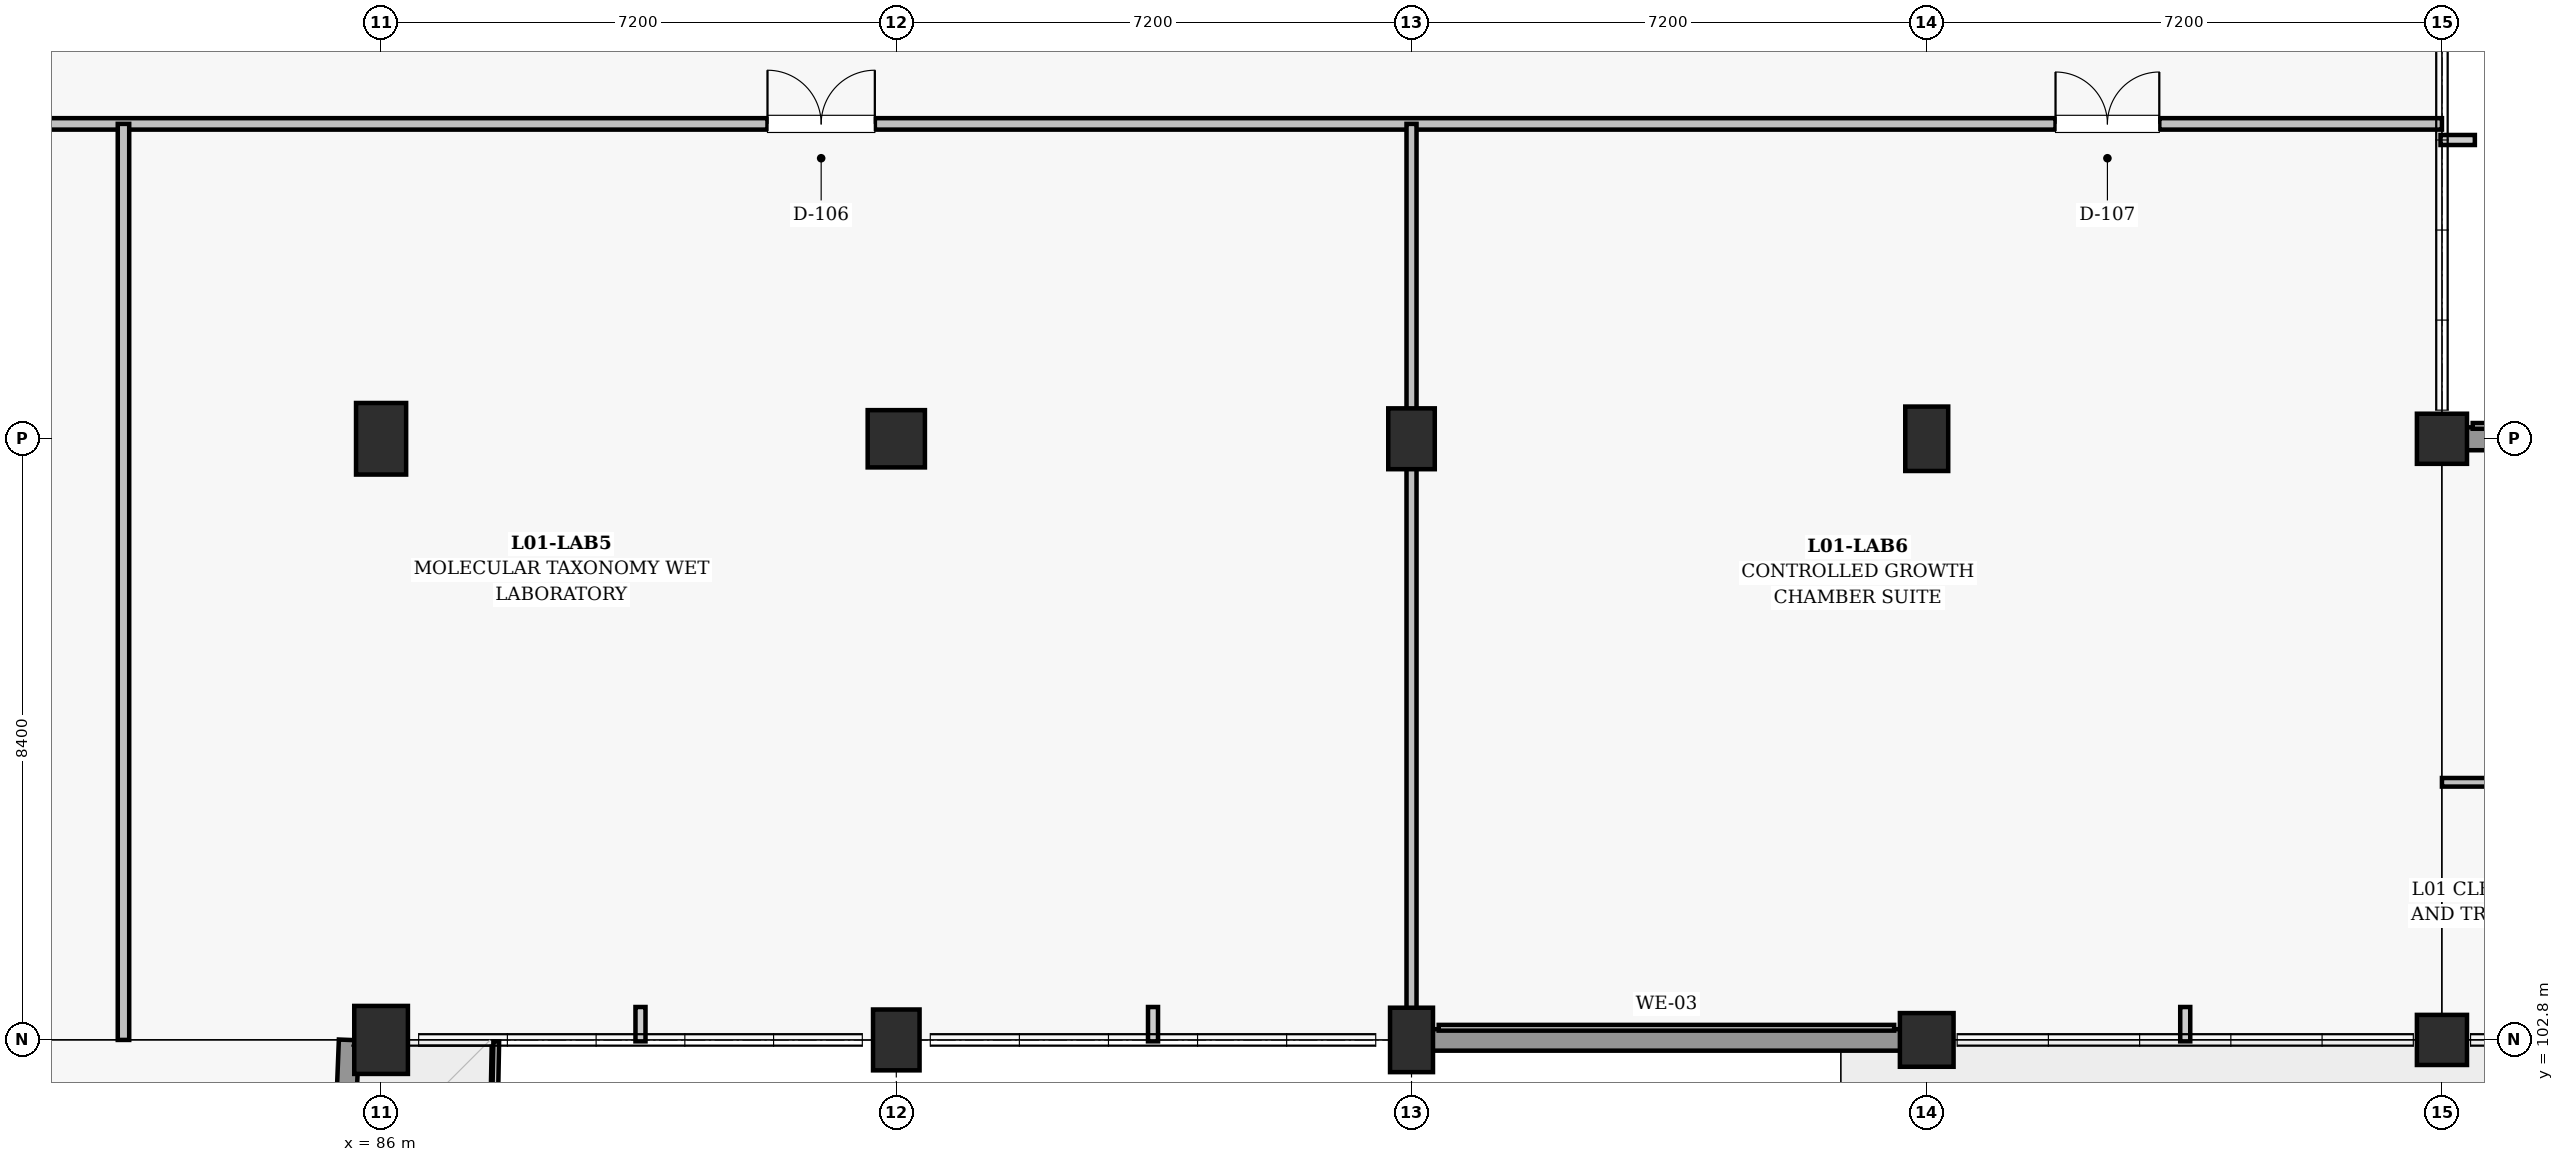
"""IFC4 building model, lengths in metres.
Left out: names, types, materials, properties, quantities, classifications, styles, units other than length and angle.
Written with IfcOpenShell. Run it as: python <this file> out.ifc"""

import sys

from ifc_helpers import new_model, si_unit, direction, frame, frame_2d, origin, origin_2d, place, context, subcontext, project, spatial, rectangle, extrude, element, fill, save


model = new_model("IFC4")
c1 = context("Model", 3, precision=1e-05, world=origin(), true_north=direction((0.0, 1.0)))
c2 = subcontext(c1, "Body", "Model", "MODEL_VIEW")
j1 = project(units=[si_unit("LENGTHUNIT", "METRE"), si_unit("PLANEANGLEUNIT", "RADIAN")], contexts=[c1])
p1 = place(None, origin())
s1 = spatial("IfcSite", under=j1, at=p1, CompositionType="ELEMENT")
p2 = place(p1, origin())
s2 = spatial("IfcBuilding", under=s1, at=p2, CompositionType="ELEMENT")
p3 = place(p2, frame((0.0, 0.0, 5.4)))
s3 = spatial("IfcBuildingStorey", under=s2, at=p3, CompositionType="ELEMENT", Elevation=5.4)
p4 = place(p3, frame((86.0, 102.8, 0.0), z_axis=(0.0, 0.0, 1.0), x_axis=(1.0, 0.0, 0.0)))
e1 = element("IfcColumn", 1, at=p4, inside=s3, PredefinedType="COLUMN", context=c2, shape_type="SweptSolid", body=[
    extrude(rectangle(XDim=0.75, YDim=0.95, at=origin_2d()), origin(), (0.0, 0.0, 1.0), 4.5),
])
p5 = place(p3, frame((86.0, 111.2, 0.0), z_axis=(0.0, 0.0, 1.0), x_axis=(1.0, 0.0, 0.0)))
e2 = element("IfcColumn", 2, at=p5, inside=s3, PredefinedType="COLUMN", context=c2, shape_type="SweptSolid", body=[
    extrude(rectangle(XDim=0.7, YDim=1.0, at=origin_2d()), origin(), (0.0, 0.0, 1.0), 4.5),
])
p6 = place(p3, frame((93.2, 102.8, 0.0), z_axis=(0.0, 0.0, 1.0), x_axis=(1.0, 0.0, 0.0)))
e3 = element("IfcColumn", 3, at=p6, inside=s3, PredefinedType="COLUMN", context=c2, shape_type="SweptSolid", body=[
    extrude(rectangle(XDim=0.65, YDim=0.85, at=origin_2d()), origin(), (0.0, 0.0, 1.0), 4.5),
])
p7 = place(p3, frame((93.2, 111.2, 0.0), z_axis=(0.0, 0.0, 1.0), x_axis=(1.0, 0.0, 0.0)))
e4 = element("IfcColumn", 4, at=p7, inside=s3, PredefinedType="COLUMN", context=c2, shape_type="SweptSolid", body=[
    extrude(rectangle(XDim=0.8, YDim=0.8, at=origin_2d()), origin(), (0.0, 0.0, 1.0), 4.5),
])
p8 = place(p3, frame((100.4, 102.8, 0.0), z_axis=(0.0, 0.0, 1.0), x_axis=(1.0, 0.0, 0.0)))
e5 = element("IfcColumn", 5, at=p8, inside=s3, PredefinedType="COLUMN", context=c2, shape_type="SweptSolid", body=[
    extrude(rectangle(XDim=0.6, YDim=0.9, at=origin_2d()), origin(), (0.0, 0.0, 1.0), 4.5),
])
p9 = place(p3, frame((100.4, 111.2, 0.0), z_axis=(0.0, 0.0, 1.0), x_axis=(1.0, 0.0, 0.0)))
e6 = element("IfcColumn", 6, at=p9, inside=s3, PredefinedType="COLUMN", context=c2, shape_type="SweptSolid", body=[
    extrude(rectangle(XDim=0.65, YDim=0.85, at=origin_2d()), origin(), (0.0, 0.0, 1.0), 4.5),
])
p10 = place(p3, frame((107.6, 102.8, 0.0), z_axis=(0.0, 0.0, 1.0), x_axis=(1.0, 0.0, 0.0)))
e7 = element("IfcColumn", 7, at=p10, inside=s3, PredefinedType="COLUMN", context=c2, shape_type="SweptSolid", body=[
    extrude(rectangle(XDim=0.75, YDim=0.75, at=origin_2d()), origin(), (0.0, 0.0, 1.0), 4.5),
])
p11 = place(p3, frame((107.6, 111.2, 0.0), z_axis=(0.0, 0.0, 1.0), x_axis=(1.0, 0.0, 0.0)))
e8 = element("IfcColumn", 8, at=p11, inside=s3, PredefinedType="COLUMN", context=c2, shape_type="SweptSolid", body=[
    extrude(rectangle(XDim=0.6, YDim=0.9, at=origin_2d()), origin(), (0.0, 0.0, 1.0), 4.5),
])
for number, where, z_axis, x_axis in (
    (9, (114.8, 102.8, 0.0), (0.0, 0.0, 1.0), (1.0, 0.0, 0.0)),
    (10, (114.8, 111.2, 0.0), (0.0, 0.0, 1.0), (1.0, 0.0, 0.0)),
):
    element("IfcColumn", number, at=place(p3, frame(where, z_axis=z_axis, x_axis=x_axis)), inside=s3, PredefinedType="COLUMN", context=c2, shape_type="SweptSolid", body=[
        extrude(rectangle(XDim=0.7, YDim=0.7, at=origin_2d()), origin(), (0.0, 0.0, 1.0), 4.5),
    ])
p12 = place(p3, frame((100.68, 102.8, 0.0), z_axis=(0.0, 0.0, 1.0), x_axis=(1.0, 0.0, 0.0)))
e11 = element("IfcWall", 11, at=p12, inside=s3, PredefinedType="SOLIDWALL", context=c2, shape_type="SweptSolid", body=[
    extrude(rectangle(XDim=6.565, YDim=0.3, at=frame_2d((3.283, 0.0))), origin(), (0.0, 0.0, 1.0), 2.955),
])
p13 = place(p3, frame((85.396, 98.881, 0.0), z_axis=(0.0, 0.0, 1.0), x_axis=(0.039279406681, 0.999228266319, 0.0)))
e12 = element("IfcWall", 12, at=p13, inside=s3, PredefinedType="SOLIDWALL", context=c2, shape_type="SweptSolid", body=[
    extrude(rectangle(XDim=3.922, YDim=0.28, at=frame_2d((1.961, 0.0))), origin(), (0.0, 0.0, 1.0), 3.405),
])
p14 = place(p3, frame((115.13, 111.2, 0.0), z_axis=(0.0, 0.0, 1.0), x_axis=(1.0, 0.0, 0.0)))
e13 = element("IfcWall", 13, at=p14, inside=s3, PredefinedType="SOLIDWALL", context=c2, shape_type="SweptSolid", body=[
    extrude(rectangle(XDim=6.665, YDim=0.32, at=frame_2d((3.333, 0.0))), origin(), (0.0, 0.0, 1.0), 2.955),
])
p15 = place(p3, frame((14.0, 115.6, 0.0), z_axis=(0.0, 0.0, 1.0), x_axis=(1.0, 0.0, 0.0)))
e14 = element("IfcWall", 14, at=p15, inside=s3, PredefinedType="PARTITIONING", context=c2, shape_type="SweptSolid", body=[
    extrude(rectangle(XDim=100.8, YDim=0.16, at=frame_2d((50.4, 0.0))), origin(), (0.0, 0.0, 1.0), 2.96),
])
p16 = place(p15, frame((29.9, 0.0, 0.0)))
e15 = element("IfcOpeningElement", 15, at=p16, cuts=e14, PredefinedType="OPENING", context=c2, shape_type="SweptSolid", body=[
    extrude(rectangle(XDim=1.35, YDim=2.2, at=frame_2d((0.675, 1.1))), frame((0.0, 0.09, 0.0), z_axis=(0.0, -1.0, 0.0), x_axis=(1.0, 0.0, 0.0)), (0.0, 0.0, 1.0), 0.18),
])
p17 = place(p15, frame((7.4, 0.0, 0.0)))
e16 = element("IfcOpeningElement", 16, at=p17, cuts=e14, PredefinedType="OPENING", context=c2, shape_type="SweptSolid", body=[
    extrude(rectangle(XDim=1.5, YDim=2.25, at=frame_2d((0.75, 1.125))), frame((0.0, 0.09, 0.0), z_axis=(0.0, -1.0, 0.0), x_axis=(1.0, 0.0, 0.0)), (0.0, 0.0, 1.0), 0.18),
])
p18 = place(p15, frame((23.8, 0.0, 0.0)))
e17 = element("IfcOpeningElement", 17, at=p18, cuts=e14, PredefinedType="OPENING", context=c2, shape_type="SweptSolid", body=[
    extrude(rectangle(XDim=1.5, YDim=2.25, at=frame_2d((0.75, 1.125))), frame((0.0, 0.09, 0.0), z_axis=(0.0, -1.0, 0.0), x_axis=(1.0, 0.0, 0.0)), (0.0, 0.0, 1.0), 0.18),
])
p19 = place(p15, frame((41.2, 0.0, 0.0)))
e18 = element("IfcOpeningElement", 18, at=p19, cuts=e14, PredefinedType="OPENING", context=c2, shape_type="SweptSolid", body=[
    extrude(rectangle(XDim=1.5, YDim=2.25, at=frame_2d((0.75, 1.125))), frame((0.0, 0.09, 0.0), z_axis=(0.0, -1.0, 0.0), x_axis=(1.0, 0.0, 0.0)), (0.0, 0.0, 1.0), 0.18),
])
p20 = place(p15, frame((59.4, 0.0, 0.0)))
e19 = element("IfcOpeningElement", 19, at=p20, cuts=e14, PredefinedType="OPENING", context=c2, shape_type="SweptSolid", body=[
    extrude(rectangle(XDim=1.5, YDim=2.25, at=frame_2d((0.75, 1.125))), frame((0.0, 0.09, 0.0), z_axis=(0.0, -1.0, 0.0), x_axis=(1.0, 0.0, 0.0)), (0.0, 0.0, 1.0), 0.18),
])
p21 = place(p15, frame((77.4, 0.0, 0.0)))
e20 = element("IfcOpeningElement", 20, at=p21, cuts=e14, PredefinedType="OPENING", context=c2, shape_type="SweptSolid", body=[
    extrude(rectangle(XDim=1.5, YDim=2.25, at=frame_2d((0.75, 1.125))), frame((0.0, 0.09, 0.0), z_axis=(0.0, -1.0, 0.0), x_axis=(1.0, 0.0, 0.0)), (0.0, 0.0, 1.0), 0.18),
])
p22 = place(p15, frame((95.4, 0.0, 0.0)))
e21 = element("IfcOpeningElement", 21, at=p22, cuts=e14, PredefinedType="OPENING", context=c2, shape_type="SweptSolid", body=[
    extrude(rectangle(XDim=1.45, YDim=2.2, at=frame_2d((0.725, 1.1))), frame((0.0, 0.09, 0.0), z_axis=(0.0, -1.0, 0.0), x_axis=(1.0, 0.0, 0.0)), (0.0, 0.0, 1.0), 0.18),
])
p23 = place(p3, frame((82.4, 102.8, 0.0), z_axis=(0.0, 0.0, 1.0), x_axis=(0.0, 1.0, 0.0)))
e22 = element("IfcWall", 22, at=p23, inside=s3, PredefinedType="PARTITIONING", context=c2, shape_type="SweptSolid", body=[
    extrude(rectangle(XDim=12.8, YDim=0.16, at=frame_2d((6.4, 0.0))), origin(), (0.0, 0.0, 1.0), 3.41),
])
p24 = place(p3, frame((100.4, 102.8, 0.0), z_axis=(0.0, 0.0, 1.0), x_axis=(0.0, 1.0, 0.0)))
e23 = element("IfcWall", 23, at=p24, inside=s3, PredefinedType="PARTITIONING", context=c2, shape_type="SweptSolid", body=[
    extrude(rectangle(XDim=12.8, YDim=0.14, at=frame_2d((6.4, 0.0))), origin(), (0.0, 0.0, 1.0), 3.36),
])
p25 = place(p3, frame((114.8, 106.4, 0.0), z_axis=(0.0, 0.0, 1.0), x_axis=(1.0, 0.0, 0.0)))
e24 = element("IfcWall", 24, at=p25, inside=s3, PredefinedType="PARTITIONING", context=c2, shape_type="SweptSolid", body=[
    extrude(rectangle(XDim=35.0, YDim=0.12, at=frame_2d((17.5, 0.0))), origin(), (0.0, 0.0, 1.0), 2.96),
])
p26 = place(p25, frame((6.7, 0.0, 0.0)))
e25 = element("IfcOpeningElement", 25, at=p26, cuts=e24, PredefinedType="OPENING", context=c2, shape_type="SweptSolid", body=[
    extrude(rectangle(XDim=1.1, YDim=2.15, at=frame_2d((0.55, 1.075))), frame((0.0, 0.07, 0.0), z_axis=(0.0, -1.0, 0.0), x_axis=(1.0, 0.0, 0.0)), (0.0, 0.0, 1.0), 0.14),
])
p27 = place(p25, frame((24.25, 0.0, 0.0)))
e26 = element("IfcOpeningElement", 26, at=p27, cuts=e24, PredefinedType="OPENING", context=c2, shape_type="SweptSolid", body=[
    extrude(rectangle(XDim=1.75, YDim=2.25, at=frame_2d((0.875, 1.125))), frame((0.0, 0.07, 0.0), z_axis=(0.0, -1.0, 0.0), x_axis=(1.0, 0.0, 0.0)), (0.0, 0.0, 1.0), 0.14),
])
p28 = place(p21, origin())
e27 = element("IfcDoor", 27, at=p28, inside=s3, OperationType="DOUBLE_DOOR_SINGLE_SWING", PredefinedType="DOOR", context=c2, shape_type="SweptSolid", body=[
    extrude(rectangle(XDim=1.5, YDim=2.25, at=frame_2d((0.75, 1.125))), frame((0.0, 0.025, 0.0), z_axis=(0.0, -1.0, 0.0), x_axis=(1.0, 0.0, 0.0)), (0.0, 0.0, 1.0), 0.05),
])
fill(e20, e27)
p29 = place(p22, origin())
e28 = element("IfcDoor", 28, at=p29, inside=s3, OperationType="DOUBLE_DOOR_SINGLE_SWING", PredefinedType="DOOR", context=c2, shape_type="SweptSolid", body=[
    extrude(rectangle(XDim=1.45, YDim=2.2, at=frame_2d((0.725, 1.1))), frame((0.0, 0.025, 0.0), z_axis=(0.0, -1.0, 0.0), x_axis=(1.0, 0.0, 0.0)), (0.0, 0.0, 1.0), 0.05),
])
fill(e21, e28)
save(model, sys.argv[1])
